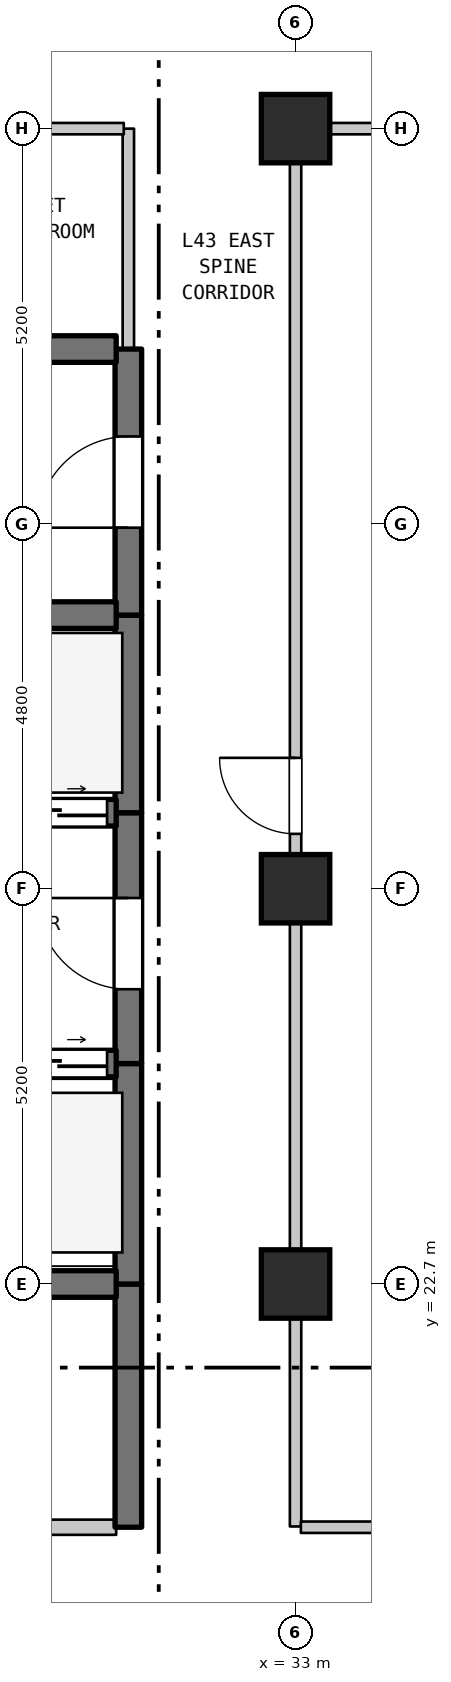
"""IFC4 building model, lengths in metres.
Left out: names, types, materials, properties, quantities, classifications, styles, units other than length and angle.
Written with IfcOpenShell. Run it as: python <this file> out.ifc"""

import sys

from ifc_helpers import new_model, si_unit, direction, frame, frame_2d, origin, origin_2d, place, context, subcontext, project, spatial, rectangle, extrude, element, fill, save


model = new_model("IFC4")
c1 = context("Model", 3, precision=1e-05, world=origin(), true_north=direction((0.0, 1.0)))
c2 = subcontext(c1, "Body", "Model", "MODEL_VIEW")
j1 = project(units=[si_unit("LENGTHUNIT", "METRE"), si_unit("PLANEANGLEUNIT", "RADIAN")], contexts=[c1])
p1 = place(None, origin())
s1 = spatial("IfcSite", under=j1, at=p1, CompositionType="ELEMENT")
p2 = place(p1, origin())
s2 = spatial("IfcBuilding", under=s1, at=p2, CompositionType="ELEMENT")
p3 = place(p2, frame((0.0, 0.0, 176.5)))
s3 = spatial("IfcBuildingStorey", under=s2, at=p3, CompositionType="ELEMENT", Elevation=176.5)
for number, where, z_axis, x_axis in (
    (1, (33.0, 22.7, 0.0), (0.0, 0.0, 1.0), (1.0, 0.0, 0.0)),
    (2, (33.0, 27.9, 0.0), (0.0, 0.0, 1.0), (1.0, 0.0, 0.0)),
    (3, (33.0, 37.9, 0.0), (0.0, 0.0, 1.0), (1.0, 0.0, 0.0)),
):
    element("IfcColumn", number, at=place(p3, frame(where, z_axis=z_axis, x_axis=x_axis)), inside=s3, PredefinedType="COLUMN", context=c2, shape_type="SweptSolid", body=[
        extrude(rectangle(XDim=0.9, YDim=0.9, at=origin_2d()), origin(), (0.0, 0.0, 1.0), 3.7),
    ])
p4 = place(p3, frame((30.8, 19.5, 0.0), z_axis=(0.0, 0.0, 1.0), x_axis=(0.0, 1.0, 0.0)))
e4 = element("IfcWall", 4, at=p4, inside=s3, PredefinedType="SHEAR", context=c2, shape_type="SweptSolid", body=[
    extrude(rectangle(XDim=3.2, YDim=0.35, at=frame_2d((1.6, 0.0))), origin(), (0.0, 0.0, 1.0), 3.39),
])
p5 = place(p3, frame((30.8, 22.7, 0.0), z_axis=(0.0, 0.0, 1.0), x_axis=(0.0, 1.0, 0.0)))
e5 = element("IfcWall", 5, at=p5, inside=s3, PredefinedType="SHEAR", context=c2, shape_type="SweptSolid", body=[
    extrude(rectangle(XDim=2.9, YDim=0.35, at=frame_2d((1.45, 0.0))), origin(), (0.0, 0.0, 1.0), 3.39),
])
p6 = place(p3, frame((30.8, 25.6, 0.0), z_axis=(0.0, 0.0, 1.0), x_axis=(0.0, 1.0, 0.0)))
e6 = element("IfcWall", 6, at=p6, inside=s3, PredefinedType="SHEAR", context=c2, shape_type="SweptSolid", body=[
    extrude(rectangle(XDim=3.3, YDim=0.35, at=frame_2d((1.65, 0.0))), origin(), (0.0, 0.0, 1.0), 3.39),
])
p7 = place(p6, frame((0.978, 0.0, 0.0)))
e7 = element("IfcOpeningElement", 7, at=p7, cuts=e6, PredefinedType="OPENING", context=c2, shape_type="SweptSolid", body=[
    extrude(rectangle(XDim=1.2, YDim=2.2, at=frame_2d((0.6, 1.1))), frame((0.0, 0.185, 0.0), z_axis=(0.0, -1.0, 0.0), x_axis=(1.0, 0.0, 0.0)), (0.0, 0.0, 1.0), 0.37),
])
p8 = place(p3, frame((30.8, 28.9, 0.0), z_axis=(0.0, 0.0, 1.0), x_axis=(0.0, 1.0, 0.0)))
e8 = element("IfcWall", 8, at=p8, inside=s3, PredefinedType="SHEAR", context=c2, shape_type="SweptSolid", body=[
    extrude(rectangle(XDim=2.6, YDim=0.35, at=frame_2d((1.3, 0.0))), origin(), (0.0, 0.0, 1.0), 3.39),
])
p9 = place(p3, frame((30.8, 31.5, 0.0), z_axis=(0.0, 0.0, 1.0), x_axis=(0.0, 1.0, 0.0)))
e9 = element("IfcWall", 9, at=p9, inside=s3, PredefinedType="SHEAR", context=c2, shape_type="SweptSolid", body=[
    extrude(rectangle(XDim=3.5, YDim=0.35, at=frame_2d((1.75, 0.0))), origin(), (0.0, 0.0, 1.0), 3.39),
])
p10 = place(p9, frame((1.15, 0.0, 0.0)))
e10 = element("IfcOpeningElement", 10, at=p10, cuts=e9, PredefinedType="OPENING", context=c2, shape_type="SweptSolid", body=[
    extrude(rectangle(XDim=1.2, YDim=2.2, at=frame_2d((0.6, 1.1))), frame((0.0, 0.185, 0.0), z_axis=(0.0, -1.0, 0.0), x_axis=(1.0, 0.0, 0.0)), (0.0, 0.0, 1.0), 0.37),
])
p11 = place(p3, frame((30.8, 35.0, 0.0), z_axis=(0.0, 0.0, 1.0), x_axis=(0.0, 1.0, 0.0)))
e11 = element("IfcWall", 11, at=p11, inside=s3, PredefinedType="STANDARD", context=c2, shape_type="SweptSolid", body=[
    extrude(rectangle(XDim=2.9, YDim=0.15, at=frame_2d((1.45, 0.0))), origin(), (0.0, 0.0, 1.0), 3.39),
])
p12 = place(p3, frame((33.0, 19.51, 0.0), z_axis=(0.0, 0.0, 1.0), x_axis=(0.0, 1.0, 0.0)))
e12 = element("IfcWall", 12, at=p12, inside=s3, PredefinedType="STANDARD", context=c2, shape_type="SweptSolid", body=[
    extrude(rectangle(XDim=8.39, YDim=0.15, at=frame_2d((4.195, 0.0))), origin(), (0.0, 0.0, 1.0), 2.99),
])
p13 = place(p3, frame((25.985, 19.5, 0.0), z_axis=(0.0, 0.0, 1.0), x_axis=(1.0, 0.0, 0.0)))
e13 = element("IfcWall", 13, at=p13, inside=s3, PredefinedType="STANDARD", context=c2, shape_type="SweptSolid", body=[
    extrude(rectangle(XDim=4.655, YDim=0.2, at=frame_2d((2.327, 0.0))), origin(), (0.0, 0.0, 1.0), 3.39),
])
p14 = place(p13, frame((1.845, 0.0, 0.0)))
e14 = element("IfcOpeningElement", 14, at=p14, cuts=e13, PredefinedType="OPENING", context=c2, shape_type="SweptSolid", body=[
    extrude(rectangle(XDim=0.9, YDim=2.15, at=frame_2d((0.45, 1.075))), frame((0.0, 0.11, 0.0), z_axis=(0.0, -1.0, 0.0), x_axis=(1.0, 0.0, 0.0)), (0.0, 0.0, 1.0), 0.22),
])
p15 = place(p3, frame((33.07, 19.5, 0.0), z_axis=(0.0, 0.0, 1.0), x_axis=(1.0, 0.0, 0.0)))
e15 = element("IfcWall", 15, at=p15, inside=s3, PredefinedType="STANDARD", context=c2, shape_type="SweptSolid", body=[
    extrude(rectangle(XDim=21.51, YDim=0.15, at=frame_2d((10.755, 0.0))), origin(), (0.0, 0.0, 1.0), 3.39),
])
p16 = place(p15, frame((10.185, 0.0, 0.0)))
e16 = element("IfcOpeningElement", 16, at=p16, cuts=e15, PredefinedType="OPENING", context=c2, shape_type="SweptSolid", body=[
    extrude(rectangle(XDim=1.0, YDim=2.15, at=frame_2d((0.5, 1.075))), frame((0.0, 0.085, 0.0), z_axis=(0.0, -1.0, 0.0), x_axis=(1.0, 0.0, 0.0)), (0.0, 0.0, 1.0), 0.17),
])
p17 = place(p3, frame((27.46, 22.7, 0.0), z_axis=(0.0, 0.0, 1.0), x_axis=(1.0, 0.0, 0.0)))
e17 = element("IfcWall", 17, at=p17, inside=s3, PredefinedType="SHEAR", context=c2, shape_type="SweptSolid", body=[
    extrude(rectangle(XDim=3.18, YDim=0.35, at=frame_2d((1.59, 0.0))), origin(), (0.0, 0.0, 1.0), 3.39),
])
p18 = place(p3, frame((27.46, 25.6, 0.0), z_axis=(0.0, 0.0, 1.0), x_axis=(1.0, 0.0, 0.0)))
e18 = element("IfcWall", 18, at=p18, inside=s3, PredefinedType="SHEAR", context=c2, shape_type="SweptSolid", body=[
    extrude(rectangle(XDim=3.18, YDim=0.35, at=frame_2d((1.59, 0.0))), origin(), (0.0, 0.0, 1.0), 3.39),
])
p19 = place(p18, frame((0.12, 0.0, 0.0)))
e19 = element("IfcOpeningElement", 19, at=p19, cuts=e18, PredefinedType="OPENING", context=c2, shape_type="SweptSolid", body=[
    extrude(rectangle(XDim=1.25, YDim=2.2, at=frame_2d((0.625, 1.1))), frame((0.0, 0.185, 0.0), z_axis=(0.0, -1.0, 0.0), x_axis=(1.0, 0.0, 0.0)), (0.0, 0.0, 1.0), 0.37),
])
p20 = place(p18, frame((1.81, 0.0, 0.0)))
e20 = element("IfcOpeningElement", 20, at=p20, cuts=e18, PredefinedType="OPENING", context=c2, shape_type="SweptSolid", body=[
    extrude(rectangle(XDim=1.25, YDim=2.2, at=frame_2d((0.625, 1.1))), frame((0.0, 0.185, 0.0), z_axis=(0.0, -1.0, 0.0), x_axis=(1.0, 0.0, 0.0)), (0.0, 0.0, 1.0), 0.37),
])
p21 = place(p3, frame((27.46, 28.9, 0.0), z_axis=(0.0, 0.0, 1.0), x_axis=(1.0, 0.0, 0.0)))
e21 = element("IfcWall", 21, at=p21, inside=s3, PredefinedType="SHEAR", context=c2, shape_type="SweptSolid", body=[
    extrude(rectangle(XDim=3.18, YDim=0.35, at=frame_2d((1.59, 0.0))), origin(), (0.0, 0.0, 1.0), 3.39),
])
p22 = place(p21, frame((0.12, 0.0, 0.0)))
e22 = element("IfcOpeningElement", 22, at=p22, cuts=e21, PredefinedType="OPENING", context=c2, shape_type="SweptSolid", body=[
    extrude(rectangle(XDim=1.25, YDim=2.2, at=frame_2d((0.625, 1.1))), frame((0.0, 0.185, 0.0), z_axis=(0.0, -1.0, 0.0), x_axis=(1.0, 0.0, 0.0)), (0.0, 0.0, 1.0), 0.37),
])
p23 = place(p21, frame((1.81, 0.0, 0.0)))
e23 = element("IfcOpeningElement", 23, at=p23, cuts=e21, PredefinedType="OPENING", context=c2, shape_type="SweptSolid", body=[
    extrude(rectangle(XDim=1.25, YDim=2.2, at=frame_2d((0.625, 1.1))), frame((0.0, 0.185, 0.0), z_axis=(0.0, -1.0, 0.0), x_axis=(1.0, 0.0, 0.0)), (0.0, 0.0, 1.0), 0.37),
])
p24 = place(p3, frame((27.46, 31.5, 0.0), z_axis=(0.0, 0.0, 1.0), x_axis=(1.0, 0.0, 0.0)))
e24 = element("IfcWall", 24, at=p24, inside=s3, PredefinedType="SHEAR", context=c2, shape_type="SweptSolid", body=[
    extrude(rectangle(XDim=3.18, YDim=0.35, at=frame_2d((1.59, 0.0))), origin(), (0.0, 0.0, 1.0), 3.39),
])
p25 = place(p3, frame((26.645, 35.0, 0.0), z_axis=(0.0, 0.0, 1.0), x_axis=(1.0, 0.0, 0.0)))
e25 = element("IfcWall", 25, at=p25, inside=s3, PredefinedType="SHEAR", context=c2, shape_type="SweptSolid", body=[
    extrude(rectangle(XDim=3.995, YDim=0.35, at=frame_2d((1.998, 0.0))), origin(), (0.0, 0.0, 1.0), 3.39),
])
p26 = place(p25, frame((1.508, 0.0, 0.0)))
e26 = element("IfcOpeningElement", 26, at=p26, cuts=e25, PredefinedType="OPENING", context=c2, shape_type="SweptSolid", body=[
    extrude(rectangle(XDim=0.95, YDim=2.15, at=frame_2d((0.475, 1.075))), frame((0.0, 0.185, 0.0), z_axis=(0.0, -1.0, 0.0), x_axis=(1.0, 0.0, 0.0)), (0.0, 0.0, 1.0), 0.37),
])
p27 = place(p3, frame((26.645, 37.9, 0.0), z_axis=(0.0, 0.0, 1.0), x_axis=(1.0, 0.0, 0.0)))
e27 = element("IfcWall", 27, at=p27, inside=s3, PredefinedType="STANDARD", context=c2, shape_type="SweptSolid", body=[
    extrude(rectangle(XDim=4.095, YDim=0.15, at=frame_2d((2.047, 0.0))), origin(), (0.0, 0.0, 1.0), 2.89),
])
p28 = place(p3, frame((33.07, 37.9, 0.0), z_axis=(0.0, 0.0, 1.0), x_axis=(1.0, 0.0, 0.0)))
e28 = element("IfcWall", 28, at=p28, inside=s3, PredefinedType="STANDARD", context=c2, shape_type="SweptSolid", body=[
    extrude(rectangle(XDim=7.155, YDim=0.15, at=frame_2d((3.578, 0.0))), origin(), (0.0, 0.0, 1.0), 3.39),
])
p29 = place(p3, frame((33.0, 27.9, 0.0), z_axis=(0.0, 0.0, 1.0), x_axis=(0.0, 1.0, 0.0)))
e29 = element("IfcWall", 29, at=p29, inside=s3, PredefinedType="STANDARD", context=c2, shape_type="SweptSolid", body=[
    extrude(rectangle(XDim=9.99, YDim=0.15, at=frame_2d((4.995, 0.0))), origin(), (0.0, 0.0, 1.0), 2.89),
])
p30 = place(p29, frame((0.722, 0.0, 0.0)))
e30 = element("IfcOpeningElement", 30, at=p30, cuts=e29, PredefinedType="OPENING", context=c2, shape_type="SweptSolid", body=[
    extrude(rectangle(XDim=1.0, YDim=2.15, at=frame_2d((0.5, 1.075))), frame((0.0, 0.085, 0.0), z_axis=(0.0, -1.0, 0.0), x_axis=(1.0, 0.0, 0.0)), (0.0, 0.0, 1.0), 0.17),
])
p31 = place(p7, origin())
e31 = element("IfcDoor", 31, at=p31, inside=s3, OperationType="SINGLE_SWING_RIGHT", PredefinedType="DOOR", context=c2, shape_type="SweptSolid", body=[
    extrude(rectangle(XDim=1.2, YDim=2.2, at=frame_2d((0.6, 1.1))), frame((0.0, 0.025, 0.0), z_axis=(0.0, -1.0, 0.0), x_axis=(1.0, 0.0, 0.0)), (0.0, 0.0, 1.0), 0.05),
])
fill(e7, e31)
p32 = place(p10, origin())
e32 = element("IfcDoor", 32, at=p32, inside=s3, OperationType="SINGLE_SWING_LEFT", PredefinedType="DOOR", context=c2, shape_type="SweptSolid", body=[
    extrude(rectangle(XDim=1.2, YDim=2.2, at=frame_2d((0.6, 1.1))), frame((0.0, 0.025, 0.0), z_axis=(0.0, -1.0, 0.0), x_axis=(1.0, 0.0, 0.0)), (0.0, 0.0, 1.0), 0.05),
])
fill(e10, e32)
p33 = place(p30, origin())
e33 = element("IfcDoor", 33, at=p33, inside=s3, OperationType="SINGLE_SWING_RIGHT", PredefinedType="DOOR", context=c2, shape_type="SweptSolid", body=[
    extrude(rectangle(XDim=1.0, YDim=2.15, at=frame_2d((0.5, 1.075))), frame((0.0, 0.025, 0.0), z_axis=(0.0, -1.0, 0.0), x_axis=(1.0, 0.0, 0.0)), (0.0, 0.0, 1.0), 0.05),
])
fill(e30, e33)
p34 = place(p20, origin())
e34 = element("IfcDoor", 34, at=p34, inside=s3, OperationType="DOUBLE_DOOR_SLIDING", PredefinedType="DOOR", context=c2, shape_type="SweptSolid", body=[
    extrude(rectangle(XDim=1.25, YDim=2.2, at=frame_2d((0.625, 1.1))), frame((0.0, 0.025, 0.0), z_axis=(0.0, -1.0, 0.0), x_axis=(1.0, 0.0, 0.0)), (0.0, 0.0, 1.0), 0.05),
])
fill(e20, e34)
p35 = place(p23, origin())
e35 = element("IfcDoor", 35, at=p35, inside=s3, OperationType="DOUBLE_DOOR_SLIDING", PredefinedType="DOOR", context=c2, shape_type="SweptSolid", body=[
    extrude(rectangle(XDim=1.25, YDim=2.2, at=frame_2d((0.625, 1.1))), frame((0.0, 0.025, 0.0), z_axis=(0.0, -1.0, 0.0), x_axis=(1.0, 0.0, 0.0)), (0.0, 0.0, 1.0), 0.05),
])
fill(e23, e35)
save(model, sys.argv[1])
